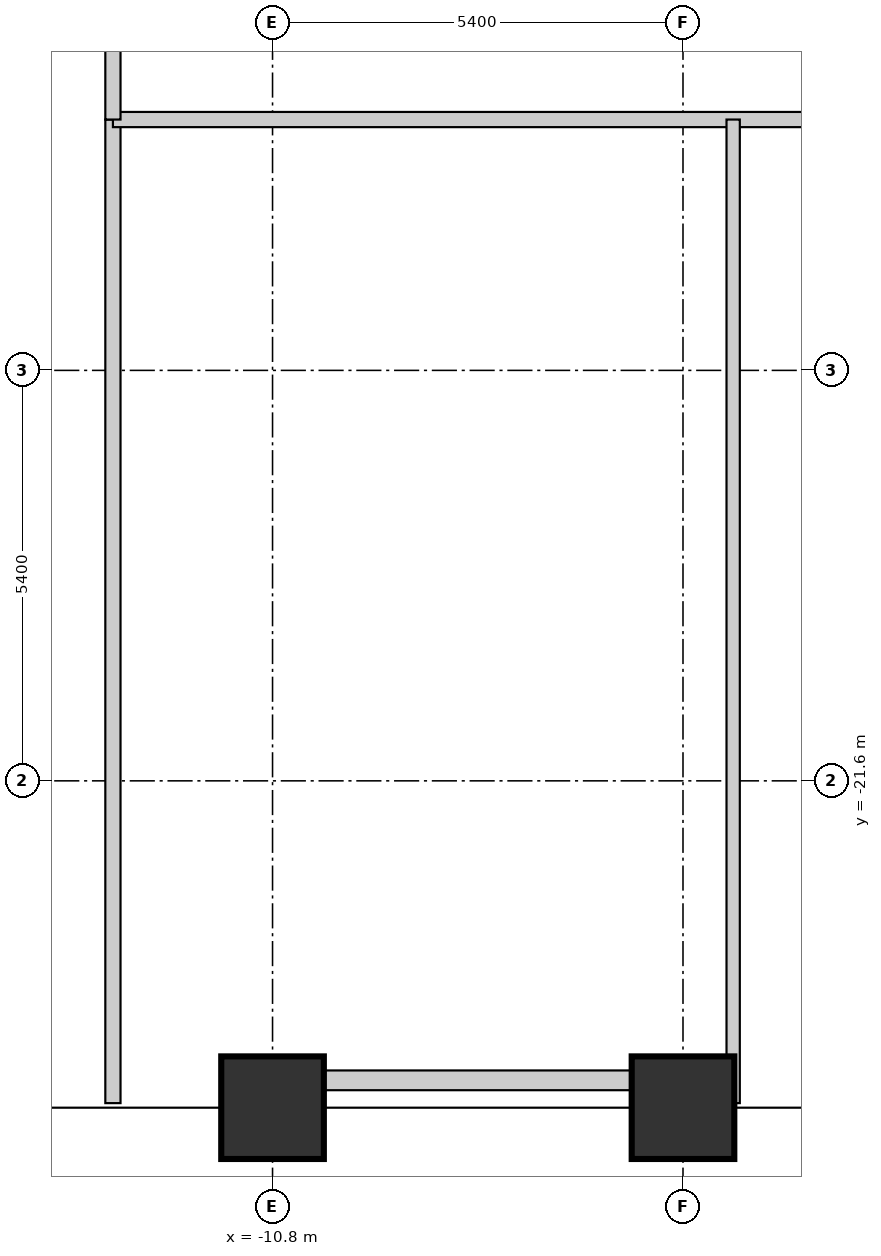
"""IFC4 building model, lengths in metres.
Left out: names, types, materials, properties, quantities, classifications, styles, units other than length and angle.
Written with IfcOpenShell. Run it as: python <this file> out.ifc"""

import sys

from ifc_helpers import new_model, si_unit, direction, frame, frame_2d, origin, origin_2d, place, context, subcontext, project, spatial, rectangle, extrude, element, fill, save


model = new_model("IFC4")
c1 = context("Model", 3, precision=1e-05, world=origin(), true_north=direction((0.0, 1.0)))
c2 = subcontext(c1, "Body", "Model", "MODEL_VIEW")
j1 = project(units=[si_unit("LENGTHUNIT", "METRE"), si_unit("PLANEANGLEUNIT", "RADIAN")], contexts=[c1])
p1 = place(None, origin())
s1 = spatial("IfcSite", under=j1, at=p1, CompositionType="ELEMENT")
p2 = place(p1, origin())
s2 = spatial("IfcBuilding", under=s1, at=p2, CompositionType="ELEMENT")
p3 = place(p2, frame((0.0, 0.0, 22.5)))
s3 = spatial("IfcBuildingStorey", under=s2, at=p3, CompositionType="ELEMENT", Elevation=22.5)
for number, where, z_axis, x_axis in (
    (1, (-10.8, -25.9, 0.0), (0.0, 0.0, 1.0), (1.0, 0.0, 0.0)),
    (2, (-5.4, -25.9, 0.0), (0.0, 0.0, 1.0), (1.0, 0.0, 0.0)),
):
    element("IfcColumn", number, at=place(p3, frame(where, z_axis=z_axis, x_axis=x_axis)), inside=s3, PredefinedType="COLUMN", context=c2, shape_type="SweptSolid", body=[
        extrude(rectangle(XDim=1.35, YDim=1.35, at=origin_2d()), origin(), (0.0, 0.0, 1.0), 3.75),
    ])
p4 = place(p3, frame((-10.127, -25.54, 0.0), z_axis=(0.0, 0.0, 1.0), x_axis=(1.0, 0.0, 0.0)))
e3 = element("IfcWall", 3, at=p4, inside=s3, PredefinedType="STANDARD", context=c2, shape_type="SweptSolid", body=[
    extrude(rectangle(XDim=4.054, YDim=0.26, at=frame_2d((2.027, 0.0))), origin(), (0.0, 0.0, 1.0), 2.629),
])
p5 = place(p3, frame((-12.9, -25.84, 0.0), z_axis=(0.0, 0.0, 1.0), x_axis=(0.0, 1.0, 0.0)))
e4 = element("IfcWall", 4, at=p5, inside=s3, PredefinedType="PARTITIONING", context=c2, shape_type="SweptSolid", body=[
    extrude(rectangle(XDim=12.94, YDim=0.2, at=frame_2d((6.47, 0.0))), origin(), (0.0, 0.0, 1.0), 2.629),
])
p6 = place(p3, frame((-12.9, -12.9, 0.0), z_axis=(0.0, 0.0, 1.0), x_axis=(1.0, 0.0, 0.0)))
e5 = element("IfcWall", 5, at=p6, inside=s3, PredefinedType="PARTITIONING", context=c2, shape_type="SweptSolid", body=[
    extrude(rectangle(XDim=24.0, YDim=0.2, at=frame_2d((12.0, 0.0))), origin(), (0.0, 0.0, 1.0), 2.93),
])
p7 = place(p6, frame((3.63, 0.0, 0.0)))
e6 = element("IfcOpeningElement", 6, at=p7, cuts=e5, PredefinedType="OPENING", context=c2, shape_type="SweptSolid", body=[
    extrude(rectangle(XDim=0.85, YDim=2.1, at=frame_2d((0.425, 1.05))), frame((0.0, 0.11, 0.0), z_axis=(0.0, -1.0, 0.0), x_axis=(1.0, 0.0, 0.0)), (0.0, 0.0, 1.0), 0.22),
])
p8 = place(p6, frame((15.19, 0.0, 0.0)))
e7 = element("IfcOpeningElement", 7, at=p8, cuts=e5, PredefinedType="OPENING", context=c2, shape_type="SweptSolid", body=[
    extrude(rectangle(XDim=0.85, YDim=2.1, at=frame_2d((0.425, 1.05))), frame((0.0, 0.11, 0.0), z_axis=(0.0, -1.0, 0.0), x_axis=(1.0, 0.0, 0.0)), (0.0, 0.0, 1.0), 0.22),
])
p9 = place(p6, frame((19.71, 0.0, 0.0)))
e8 = element("IfcOpeningElement", 8, at=p9, cuts=e5, PredefinedType="OPENING", context=c2, shape_type="SweptSolid", body=[
    extrude(rectangle(XDim=0.85, YDim=2.1, at=frame_2d((0.425, 1.05))), frame((0.0, 0.11, 0.0), z_axis=(0.0, -1.0, 0.0), x_axis=(1.0, 0.0, 0.0)), (0.0, 0.0, 1.0), 0.22),
])
p10 = place(p3, frame((-12.9, -12.9, 0.0), z_axis=(0.0, 0.0, 1.0), x_axis=(0.0, 1.0, 0.0)))
e9 = element("IfcWall", 9, at=p10, inside=s3, PredefinedType="PARTITIONING", context=c2, shape_type="SweptSolid", body=[
    extrude(rectangle(XDim=25.8, YDim=0.2, at=frame_2d((12.9, 0.0))), origin(), (0.0, 0.0, 1.0), 3.57),
])
p11 = place(p10, frame((0.28, 0.0, 0.0)))
e10 = element("IfcOpeningElement", 10, at=p11, cuts=e9, PredefinedType="OPENING", context=c2, shape_type="SweptSolid", body=[
    extrude(rectangle(XDim=0.95, YDim=2.1, at=frame_2d((0.475, 1.05))), frame((0.0, 0.11, 0.0), z_axis=(0.0, -1.0, 0.0), x_axis=(1.0, 0.0, 0.0)), (0.0, 0.0, 1.0), 0.22),
])
p12 = place(p10, frame((24.205, 0.0, 0.0)))
e11 = element("IfcOpeningElement", 11, at=p12, cuts=e9, PredefinedType="OPENING", context=c2, shape_type="SweptSolid", body=[
    extrude(rectangle(XDim=0.85, YDim=2.1, at=frame_2d((0.425, 1.05))), frame((0.0, 0.11, 0.0), z_axis=(0.0, -1.0, 0.0), x_axis=(1.0, 0.0, 0.0)), (0.0, 0.0, 1.0), 0.22),
])
p13 = place(p10, frame((21.87, 0.0, 0.0)))
e12 = element("IfcOpeningElement", 12, at=p13, cuts=e9, PredefinedType="OPENING", context=c2, shape_type="SweptSolid", body=[
    extrude(rectangle(XDim=0.95, YDim=2.1, at=frame_2d((0.475, 1.05))), frame((0.0, 0.11, 0.0), z_axis=(0.0, -1.0, 0.0), x_axis=(1.0, 0.0, 0.0)), (0.0, 0.0, 1.0), 0.22),
])
p14 = place(p10, frame((5.16, 0.0, 0.0)))
e13 = element("IfcOpeningElement", 13, at=p14, cuts=e9, PredefinedType="OPENING", context=c2, shape_type="SweptSolid", body=[
    extrude(rectangle(XDim=0.95, YDim=2.1, at=frame_2d((0.475, 1.05))), frame((0.0, 0.11, 0.0), z_axis=(0.0, -1.0, 0.0), x_axis=(1.0, 0.0, 0.0)), (0.0, 0.0, 1.0), 0.22),
])
p15 = place(p10, frame((10.785, 0.0, 0.0)))
e14 = element("IfcOpeningElement", 14, at=p15, cuts=e9, PredefinedType="OPENING", context=c2, shape_type="SweptSolid", body=[
    extrude(rectangle(XDim=0.95, YDim=2.1, at=frame_2d((0.475, 1.05))), frame((0.0, 0.11, 0.0), z_axis=(0.0, -1.0, 0.0), x_axis=(1.0, 0.0, 0.0)), (0.0, 0.0, 1.0), 0.22),
])
p16 = place(p10, frame((15.045, 0.0, 0.0)))
e15 = element("IfcOpeningElement", 15, at=p16, cuts=e9, PredefinedType="OPENING", context=c2, shape_type="SweptSolid", body=[
    extrude(rectangle(XDim=0.95, YDim=2.1, at=frame_2d((0.475, 1.05))), frame((0.0, 0.11, 0.0), z_axis=(0.0, -1.0, 0.0), x_axis=(1.0, 0.0, 0.0)), (0.0, 0.0, 1.0), 0.22),
])
p17 = place(p3, frame((-4.74, -25.84, 0.0), z_axis=(0.0, 0.0, 1.0), x_axis=(0.0, 1.0, 0.0)))
e16 = element("IfcWall", 16, at=p17, inside=s3, PredefinedType="PARTITIONING", context=c2, shape_type="SweptSolid", body=[
    extrude(rectangle(XDim=12.94, YDim=0.175, at=frame_2d((6.47, 0.0))), origin(), (0.0, 0.0, 1.0), 2.629),
])
p18 = place(p11, origin())
e17 = element("IfcDoor", 17, at=p18, inside=s3, OperationType="SINGLE_SWING_RIGHT", PredefinedType="DOOR", context=c2, shape_type="SweptSolid", body=[
    extrude(rectangle(XDim=0.95, YDim=2.1, at=frame_2d((0.475, 1.05))), frame((0.0, 0.025, 0.0), z_axis=(0.0, -1.0, 0.0), x_axis=(1.0, 0.0, 0.0)), (0.0, 0.0, 1.0), 0.05),
])
fill(e10, e17)
p19 = place(p7, origin())
e18 = element("IfcDoor", 18, at=p19, inside=s3, OperationType="SINGLE_SWING_LEFT", PredefinedType="DOOR", context=c2, shape_type="SweptSolid", body=[
    extrude(rectangle(XDim=0.85, YDim=2.1, at=frame_2d((0.425, 1.05))), frame((0.0, 0.025, 0.0), z_axis=(0.0, -1.0, 0.0), x_axis=(1.0, 0.0, 0.0)), (0.0, 0.0, 1.0), 0.05),
])
fill(e6, e18)
save(model, sys.argv[1])
